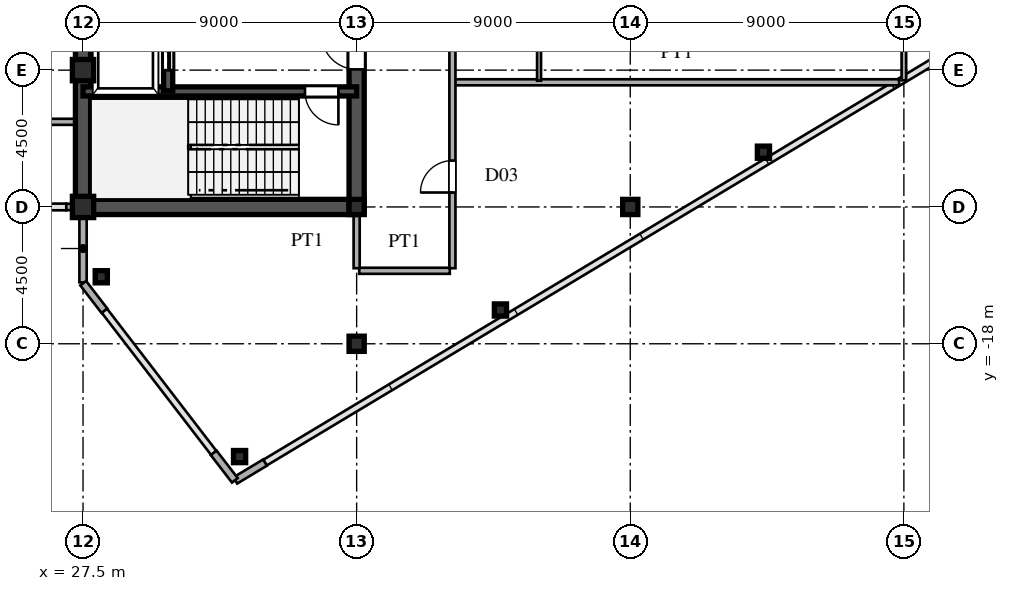
"""IFC4 building model, lengths in metres.
Left out: names, types, materials, properties, quantities, classifications, styles, units other than length and angle.
Written with IfcOpenShell. Run it as: python <this file> out.ifc"""

import sys

from ifc_helpers import new_model, si_unit, direction, frame, frame_2d, origin, origin_2d, place, context, subcontext, project, spatial, rectangle, hollow_rectangle, i_section, extrude, source, transform, mapped, element, fill, save


model = new_model("IFC4")
c1 = context("Model", 3, precision=1e-05, world=origin(), true_north=direction((0.0, 1.0)))
c2 = subcontext(c1, "Body", "Model", "MODEL_VIEW")
j1 = project(units=[si_unit("LENGTHUNIT", "METRE"), si_unit("PLANEANGLEUNIT", "RADIAN")], contexts=[c1])
p1 = place(None, origin())
s1 = spatial("IfcSite", under=j1, at=p1, CompositionType="ELEMENT")
p2 = place(p1, origin())
s2 = spatial("IfcBuilding", under=s1, at=p2, CompositionType="ELEMENT")
p3 = place(p2, frame((0.0, 0.0, 234.6)))
s3 = spatial("IfcBuildingStorey", under=s2, at=p3, CompositionType="ELEMENT", Elevation=234.6)
m1 = source(origin(), c2, "Body", "SweptSolid", [
    extrude(hollow_rectangle(XDim=0.7, YDim=0.7, WallThickness=0.03, at=origin_2d()), origin(), (0.0, 0.0, 1.0), 4.8),
])
for number, where, z_axis, x_axis in (
    (1, (27.5, -13.5, 0.0), (0.0, 0.0, 1.0), (1.0, 0.0, 0.0)),
    (2, (27.5, -9.0, 0.0), (0.0, 0.0, 1.0), (1.0, 0.0, 0.0)),
):
    element("IfcColumn", number, at=place(p3, frame(where, z_axis=z_axis, x_axis=x_axis)), inside=s3, PredefinedType="COLUMN", context=c2, shape_type="MappedRepresentation", body=[
        mapped(m1, transform((0.0, 0.0, 0.0), scale=1.0)),
    ])
m2 = source(origin(), c2, "Body", "SweptSolid", [
    extrude(i_section(OverallWidth=0.5, OverallDepth=0.5, WebThickness=0.02, FlangeThickness=0.032, at=origin_2d()), origin(), (0.0, 0.0, 1.0), 4.8),
])
for number, where, z_axis, x_axis in (
    (3, (36.5, -18.0, 0.0), (0.0, 0.0, 1.0), (1.0, 0.0, 0.0)),
    (4, (36.5, -13.5, 0.0), (0.0, 0.0, 1.0), (1.0, 0.0, 0.0)),
    (5, (45.5, -13.5, 0.0), (0.0, 0.0, 1.0), (1.0, 0.0, 0.0)),
):
    element("IfcColumn", number, at=place(p3, frame(where, z_axis=z_axis, x_axis=x_axis)), inside=s3, PredefinedType="COLUMN", context=c2, shape_type="MappedRepresentation", body=[
        mapped(m2, transform((0.0, 0.0, 0.0), scale=1.0)),
    ])
m3 = source(origin(), c2, "Body", "SweptSolid", [
    extrude(hollow_rectangle(XDim=0.4, YDim=0.4, WallThickness=0.016, at=origin_2d()), origin(), (0.0, 0.0, 1.0), 4.8),
])
for number, where, z_axis, x_axis in (
    (6, (32.65, -21.71, 0.0), (0.0, 0.0, 1.0), (1.0, 0.0, 0.0)),
    (7, (28.1, -15.796, 0.0), (0.0, 0.0, 1.0), (1.0, 0.0, 0.0)),
    (8, (41.23, -16.889, 0.0), (0.0, 0.0, 1.0), (1.0, 0.0, 0.0)),
    (9, (49.88, -11.699, 0.0), (0.0, 0.0, 1.0), (1.0, 0.0, 0.0)),
):
    element("IfcColumn", number, at=place(p3, frame(where, z_axis=z_axis, x_axis=x_axis)), inside=s3, PredefinedType="COLUMN", context=c2, shape_type="MappedRepresentation", body=[
        mapped(m3, transform((0.0, 0.0, 0.0), scale=1.0)),
    ])
p4 = place(p3, frame((32.509, -22.495, 0.0), z_axis=(0.0, 0.0, 1.0), x_axis=(0.85743623509, 0.514590228002, 0.0)))
e10 = element("IfcWall", 10, at=p4, inside=s3, PredefinedType="SOLIDWALL", context=c2, shape_type="SweptSolid", body=[
    extrude(rectangle(XDim=1.14, YDim=0.24, at=frame_2d((0.57, 0.0))), origin(), (0.0, 0.0, 1.0), 4.58),
])
p5 = place(p3, frame((27.5, -15.98, 0.0), z_axis=(0.0, 0.0, 1.0), x_axis=(0.0, 1.0, 0.0)))
e11 = element("IfcWall", 11, at=p5, inside=s3, PredefinedType="SOLIDWALL", context=c2, shape_type="SweptSolid", body=[
    extrude(rectangle(XDim=1.605, YDim=0.24, at=frame_2d((0.803, 0.0))), origin(), (0.0, 0.0, 1.0), 4.58),
])
p6 = place(p3, frame((27.5, -14.375, 0.0), z_axis=(0.0, 0.0, 1.0), x_axis=(0.0, 1.0, 0.0)))
e12 = element("IfcWall", 12, at=p6, inside=s3, PredefinedType="SOLIDWALL", context=c2, shape_type="SweptSolid", body=[
    extrude(rectangle(XDim=0.62, YDim=0.24, at=frame_2d((0.31, 0.0))), origin(), (0.0, 0.0, 1.0), 4.08),
])
for number, where, z_axis, x_axis in (
    (13, (27.506, -16.008, 0.0), (0.0, 0.0, 1.0), (0.61, -0.793, 0.0)),
    (14, (31.799, -21.588, 0.0), (0.0, 0.0, 1.0), (0.61, -0.793, 0.0)),
):
    element("IfcWall", number, at=place(p3, frame(where, z_axis=z_axis, x_axis=x_axis)), inside=s3, PredefinedType="SOLIDWALL", context=c2, shape_type="SweptSolid", body=[
        extrude(rectangle(XDim=1.14, YDim=0.24, at=frame_2d((0.57, 0.0))), origin(), (0.0, 0.0, 1.0), 4.58),
    ])
p7 = place(p3, frame((26.95, -13.5, 0.0), z_axis=(0.0, 0.0, 1.0), x_axis=(1.0, 0.0, 0.0)))
e15 = element("IfcWall", 15, at=p7, inside=s3, PredefinedType="SOLIDWALL", context=c2, shape_type="SweptSolid", body=[
    extrude(rectangle(XDim=0.54, YDim=0.21, at=frame_2d((0.27, 0.0))), origin(), (0.0, 0.0, 1.0), 2.78),
])
p8 = place(p3, frame((27.5, -13.5, 0.0), z_axis=(0.0, 0.0, 1.0), x_axis=(0.0, 1.0, 0.0)))
e16 = element("IfcWall", 16, at=p8, inside=s3, PredefinedType="SHEAR", context=c2, shape_type="SweptSolid", body=[
    extrude(rectangle(XDim=12.2, YDim=0.5, at=frame_2d((6.1, 0.0))), origin(), (0.0, 0.0, 1.0), 4.58),
])
p9 = place(p3, frame((27.5, -13.5, 0.0), z_axis=(0.0, 0.0, 1.0), x_axis=(1.0, 0.0, 0.0)))
e17 = element("IfcWall", 17, at=p9, inside=s3, PredefinedType="SHEAR", context=c2, shape_type="SweptSolid", body=[
    extrude(rectangle(XDim=9.0, YDim=0.5, at=frame_2d((4.5, 0.0))), origin(), (0.0, 0.0, 1.0), 4.58),
])
p10 = place(p3, frame((36.5, -13.65, 0.0), z_axis=(0.0, 0.0, 1.0), x_axis=(0.0, 1.0, 0.0)))
e18 = element("IfcWall", 18, at=p10, inside=s3, PredefinedType="SHEAR", context=c2, shape_type="SweptSolid", body=[
    extrude(rectangle(XDim=7.15, YDim=0.5, at=frame_2d((3.575, 0.0))), origin(), (0.0, 0.0, 1.0), 4.58),
])
p11 = place(p10, frame((4.675, 0.0, 0.0)))
e19 = element("IfcOpeningElement", 19, at=p11, cuts=e18, PredefinedType="OPENING", context=c2, shape_type="SweptSolid", body=[
    extrude(rectangle(XDim=1.15, YDim=2.2, at=frame_2d((0.575, 1.1))), frame((0.0, 0.26, 0.0), z_axis=(0.0, -1.0, 0.0), x_axis=(1.0, 0.0, 0.0)), (0.0, 0.0, 1.0), 0.52),
])
p12 = place(p3, frame((27.5, -9.7, 0.0), z_axis=(0.0, 0.0, 1.0), x_axis=(1.0, 0.0, 0.0)))
e20 = element("IfcWall", 20, at=p12, inside=s3, PredefinedType="SHEAR", context=c2, shape_type="SweptSolid", body=[
    extrude(rectangle(XDim=9.0, YDim=0.3, at=frame_2d((4.5, 0.0))), origin(), (0.0, 0.0, 1.0), 4.58),
])
p13 = place(p12, frame((7.3, 0.0, 0.0)))
e21 = element("IfcOpeningElement", 21, at=p13, cuts=e20, PredefinedType="OPENING", context=c2, shape_type="SweptSolid", body=[
    extrude(rectangle(XDim=1.1, YDim=2.2, at=frame_2d((0.55, 1.1))), frame((0.0, 0.16, 0.0), z_axis=(0.0, -1.0, 0.0), x_axis=(1.0, 0.0, 0.0)), (0.0, 0.0, 1.0), 0.32),
])
p14 = place(p3, frame((30.3, -9.68, 0.0), z_axis=(0.0, 0.0, 1.0), x_axis=(0.0, 1.0, 0.0)))
e22 = element("IfcWall", 22, at=p14, inside=s3, PredefinedType="SHEAR", context=c2, shape_type="SweptSolid", body=[
    extrude(rectangle(XDim=2.56, YDim=0.3, at=frame_2d((1.28, 0.0))), origin(), (0.0, 0.0, 1.0), 4.58),
])
p15 = place(p14, frame((0.68, 0.0, 0.0)))
e23 = element("IfcOpeningElement", 23, at=p15, cuts=e22, PredefinedType="OPENING", context=c2, shape_type="SweptSolid", body=[
    extrude(rectangle(XDim=1.2, YDim=2.25, at=frame_2d((0.6, 1.125))), frame((0.0, 0.16, 0.0), z_axis=(0.0, -1.0, 0.0), x_axis=(1.0, 0.0, 0.0)), (0.0, 0.0, 1.0), 0.32),
])
p16 = place(p3, frame((36.585, -15.6, 0.0), z_axis=(0.0, 0.0, 1.0), x_axis=(1.0, 0.0, 0.0)))
e24 = element("IfcWall", 24, at=p16, inside=s3, PredefinedType="PARTITIONING", context=c2, shape_type="SweptSolid", body=[
    extrude(rectangle(XDim=2.98, YDim=0.2, at=frame_2d((1.49, 0.0))), origin(), (0.0, 0.0, 1.0), 4.58),
])
p17 = place(p3, frame((-27.245, -10.7, 0.0), z_axis=(0.0, 0.0, 1.0), x_axis=(1.0, 0.0, 0.0)))
e25 = element("IfcWall", 25, at=p17, inside=s3, PredefinedType="PARTITIONING", context=c2, shape_type="SweptSolid", body=[
    extrude(rectangle(XDim=54.49, YDim=0.2, at=frame_2d((27.245, 0.0))), origin(), (0.0, 0.0, 1.0), 4.58),
])
p18 = place(p17, frame((25.77, 0.0, 0.0)))
e26 = element("IfcOpeningElement", 26, at=p18, cuts=e25, PredefinedType="OPENING", context=c2, shape_type="SweptSolid", body=[
    extrude(rectangle(XDim=1.15, YDim=2.2, at=frame_2d((0.575, 1.1))), frame((0.0, 0.11, 0.0), z_axis=(0.0, -1.0, 0.0), x_axis=(1.0, 0.0, 0.0)), (0.0, 0.0, 1.0), 0.22),
])
p19 = place(p3, frame((39.73, -9.4, 0.0), z_axis=(0.0, 0.0, 1.0), x_axis=(1.0, 0.0, 0.0)))
e27 = element("IfcWall", 27, at=p19, inside=s3, PredefinedType="PARTITIONING", context=c2, shape_type="SweptSolid", body=[
    extrude(rectangle(XDim=14.613, YDim=0.2, at=frame_2d((7.307, 0.0))), origin(), (0.0, 0.0, 1.0), 4.58),
])
p20 = place(p3, frame((36.5, -15.515, 0.0), z_axis=(0.0, 0.0, 1.0), x_axis=(0.0, 1.0, 0.0)))
e28 = element("IfcWall", 28, at=p20, inside=s3, PredefinedType="PARTITIONING", context=c2, shape_type="SweptSolid", body=[
    extrude(rectangle(XDim=1.76, YDim=0.2, at=frame_2d((0.88, 0.0))), origin(), (0.0, 0.0, 1.0), 3.98),
])
p21 = place(p3, frame((39.65, -15.515, 0.0), z_axis=(0.0, 0.0, 1.0), x_axis=(0.0, 1.0, 0.0)))
e29 = element("IfcWall", 29, at=p21, inside=s3, PredefinedType="PARTITIONING", context=c2, shape_type="SweptSolid", body=[
    extrude(rectangle(XDim=31.03, YDim=0.2, at=frame_2d((15.515, 0.0))), origin(), (0.0, 0.0, 1.0), 4.58),
])
p22 = place(p21, frame((2.49, 0.0, 0.0)))
e30 = element("IfcOpeningElement", 30, at=p22, cuts=e29, PredefinedType="OPENING", context=c2, shape_type="SweptSolid", body=[
    extrude(rectangle(XDim=1.05, YDim=2.25, at=frame_2d((0.525, 1.125))), frame((0.0, 0.11, 0.0), z_axis=(0.0, -1.0, 0.0), x_axis=(1.0, 0.0, 0.0)), (0.0, 0.0, 1.0), 0.22),
])
p23 = place(p21, frame((11.895, 0.0, 0.0)))
e31 = element("IfcOpeningElement", 31, at=p23, cuts=e29, PredefinedType="OPENING", context=c2, shape_type="SweptSolid", body=[
    extrude(rectangle(XDim=1.05, YDim=2.25, at=frame_2d((0.525, 1.125))), frame((0.0, 0.11, 0.0), z_axis=(0.0, -1.0, 0.0), x_axis=(1.0, 0.0, 0.0)), (0.0, 0.0, 1.0), 0.22),
])
p24 = place(p21, frame((24.59, 0.0, 0.0)))
e32 = element("IfcOpeningElement", 32, at=p24, cuts=e29, PredefinedType="OPENING", context=c2, shape_type="SweptSolid", body=[
    extrude(rectangle(XDim=1.05, YDim=2.25, at=frame_2d((0.525, 1.125))), frame((0.0, 0.11, 0.0), z_axis=(0.0, -1.0, 0.0), x_axis=(1.0, 0.0, 0.0)), (0.0, 0.0, 1.0), 0.22),
])
p25 = place(p3, frame((42.5, -9.35, 0.0), z_axis=(0.0, 0.0, 1.0), x_axis=(0.0, 1.0, 0.0)))
e33 = element("IfcWall", 33, at=p25, inside=s3, PredefinedType="PARTITIONING", context=c2, shape_type="SweptSolid", body=[
    extrude(rectangle(XDim=3.408, YDim=0.13, at=frame_2d((1.704, 0.0))), origin(), (0.0, 0.0, 1.0), 4.58),
])
p26 = place(p3, frame((54.5, -9.335, 0.0), z_axis=(0.0, 0.0, 1.0), x_axis=(0.0, 1.0, 0.0)))
e34 = element("IfcWall", 34, at=p26, inside=s3, PredefinedType="PARTITIONING", context=c2, shape_type="SweptSolid", body=[
    extrude(rectangle(XDim=12.885, YDim=0.15, at=frame_2d((6.442, 0.0))), origin(), (0.0, 0.0, 1.0), 3.98),
])
p27 = place(p26, frame((5.96, 0.0, 0.0)))
e35 = element("IfcOpeningElement", 35, at=p27, cuts=e34, PredefinedType="OPENING", context=c2, shape_type="SweptSolid", body=[
    extrude(rectangle(XDim=0.95, YDim=2.15, at=frame_2d((0.475, 1.075))), frame((0.0, 0.085, 0.0), z_axis=(0.0, -1.0, 0.0), x_axis=(1.0, 0.0, 0.0)), (0.0, 0.0, 1.0), 0.17),
])
p28 = place(p26, frame((1.677, 0.0, 0.0)))
e36 = element("IfcOpeningElement", 36, at=p28, cuts=e34, PredefinedType="OPENING", context=c2, shape_type="SweptSolid", body=[
    extrude(rectangle(XDim=0.95, YDim=2.15, at=frame_2d((0.475, 1.075))), frame((0.0, 0.085, 0.0), z_axis=(0.0, -1.0, 0.0), x_axis=(1.0, 0.0, 0.0)), (0.0, 0.0, 1.0), 0.17),
])
p29 = place(p26, frame((10.293, 0.0, 0.0)))
e37 = element("IfcOpeningElement", 37, at=p29, cuts=e34, PredefinedType="OPENING", context=c2, shape_type="SweptSolid", body=[
    extrude(rectangle(XDim=0.95, YDim=2.15, at=frame_2d((0.475, 1.075))), frame((0.0, 0.085, 0.0), z_axis=(0.0, -1.0, 0.0), x_axis=(1.0, 0.0, 0.0)), (0.0, 0.0, 1.0), 0.17),
])
m4 = source(origin(), c2, "Body", "SweptSolid", [
    extrude(rectangle(XDim=1.15, YDim=2.2, at=frame_2d((0.575, 1.1))), frame((0.0, 0.025, 0.0), z_axis=(0.0, -1.0, 0.0), x_axis=(1.0, 0.0, 0.0)), (0.0, 0.0, 1.0), 0.05),
])
p30 = place(p11, origin())
e38 = element("IfcDoor", 38, at=p30, inside=s3, OperationType="SINGLE_SWING_RIGHT", PredefinedType="DOOR", context=c2, shape_type="MappedRepresentation", body=[
    mapped(m4, transform((0.0, 0.0, 0.0), scale=1.0)),
])
fill(e19, e38)
m5 = source(origin(), c2, "Body", "SweptSolid", [
    extrude(rectangle(XDim=1.1, YDim=2.2, at=frame_2d((0.55, 1.1))), frame((0.0, 0.025, 0.0), z_axis=(0.0, -1.0, 0.0), x_axis=(1.0, 0.0, 0.0)), (0.0, 0.0, 1.0), 0.05),
])
p31 = place(p13, frame((1.1, 0.0, 0.0), z_axis=(0.0, 0.0, 1.0), x_axis=(-1.0, 0.0, 0.0)))
e39 = element("IfcDoor", 39, at=p31, inside=s3, OperationType="SINGLE_SWING_RIGHT", PredefinedType="DOOR", context=c2, shape_type="MappedRepresentation", body=[
    mapped(m5, transform((0.0, 0.0, 0.0), scale=1.0)),
])
fill(e21, e39)
m6 = source(origin(), c2, "Body", "SweptSolid", [
    extrude(rectangle(XDim=1.2, YDim=2.25, at=frame_2d((0.6, 1.125))), frame((0.0, 0.025, 0.0), z_axis=(0.0, -1.0, 0.0), x_axis=(1.0, 0.0, 0.0)), (0.0, 0.0, 1.0), 0.05),
])
p32 = place(p15, origin())
e40 = element("IfcDoor", 40, at=p32, inside=s3, OperationType="DOUBLE_DOOR_SLIDING", PredefinedType="DOOR", context=c2, shape_type="MappedRepresentation", body=[
    mapped(m6, transform((0.0, 0.0, 0.0), scale=1.0)),
])
fill(e23, e40)
m7 = source(origin(), c2, "Body", "SweptSolid", [
    extrude(rectangle(XDim=1.05, YDim=2.25, at=frame_2d((0.525, 1.125))), frame((0.0, 0.025, 0.0), z_axis=(0.0, -1.0, 0.0), x_axis=(1.0, 0.0, 0.0)), (0.0, 0.0, 1.0), 0.05),
])
p33 = place(p22, origin())
e41 = element("IfcDoor", 41, at=p33, inside=s3, OperationType="SINGLE_SWING_LEFT", PredefinedType="DOOR", context=c2, shape_type="MappedRepresentation", body=[
    mapped(m7, transform((0.0, 0.0, 0.0), scale=1.0)),
])
fill(e30, e41)
save(model, sys.argv[1])
